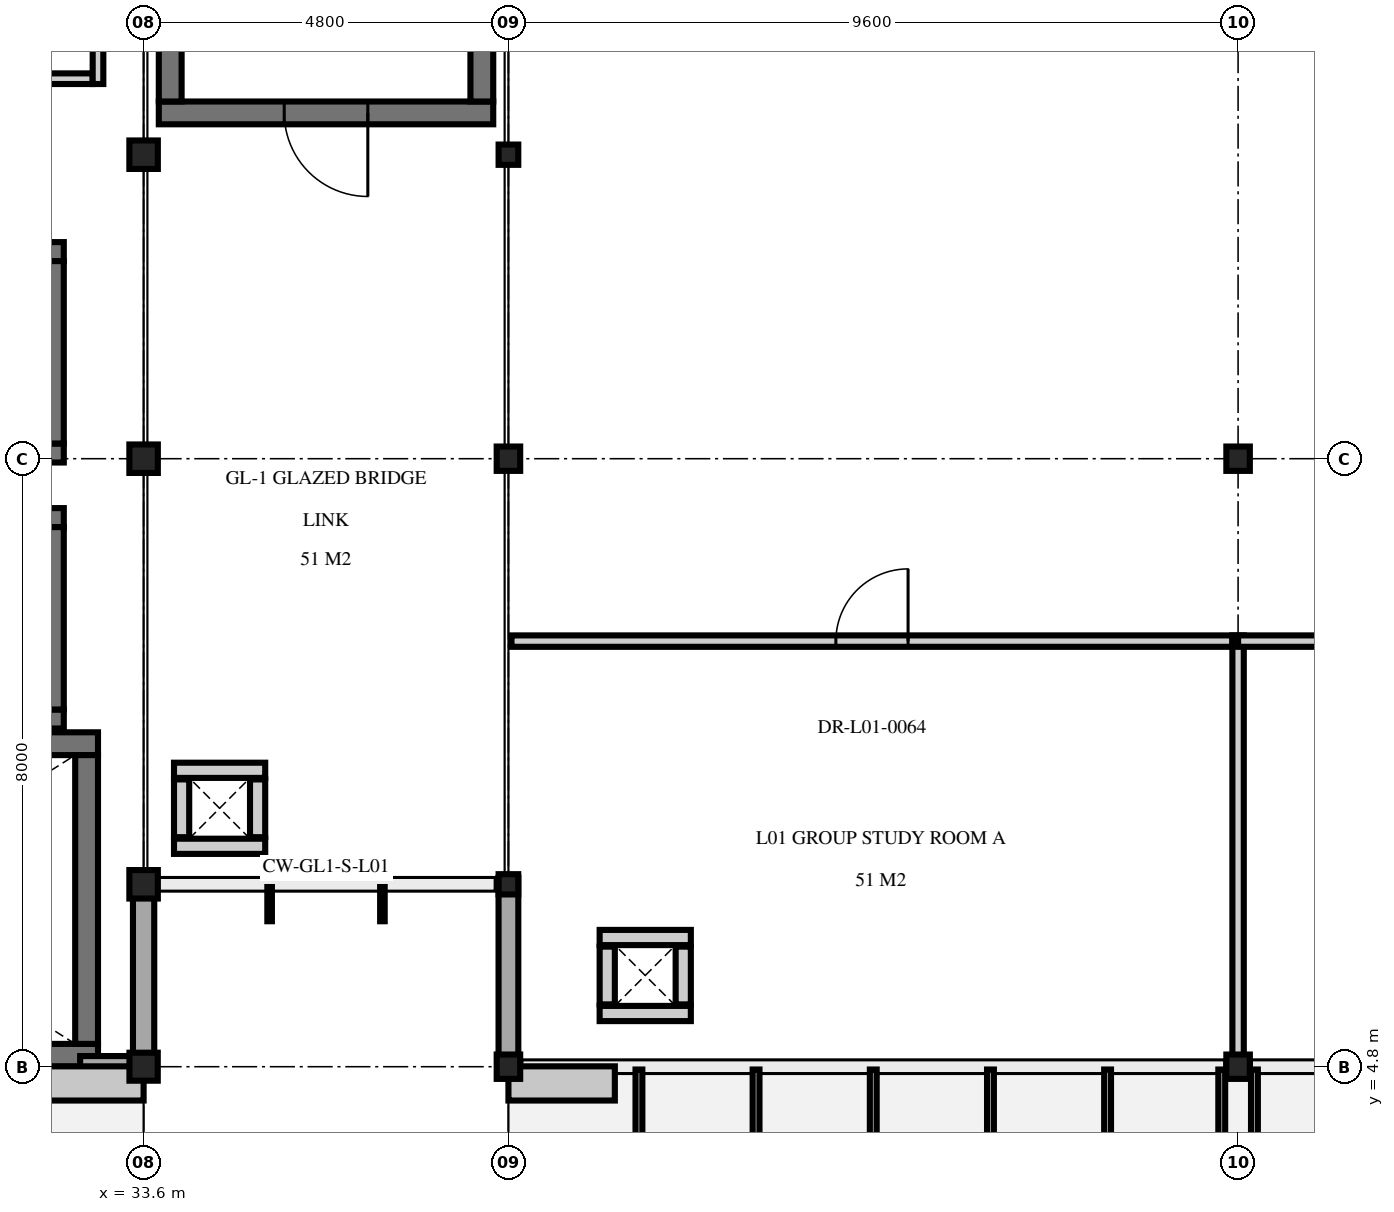
"""IFC4 building model, lengths in metres.
Left out: names, types, materials, properties, quantities, classifications, styles, units other than length and angle.
Written with IfcOpenShell. Run it as: python <this file> out.ifc"""

import sys

from ifc_helpers import new_model, si_unit, direction, frame, frame_2d, origin, origin_2d, place, context, subcontext, project, spatial, rectangle, i_section, extrude, element, fill, save


model = new_model("IFC4")
c1 = context("Model", 3, precision=1e-05, world=origin(), true_north=direction((0.0, 1.0)))
c2 = subcontext(c1, "Body", "Model", "MODEL_VIEW")
j1 = project(units=[si_unit("LENGTHUNIT", "METRE"), si_unit("PLANEANGLEUNIT", "RADIAN")], contexts=[c1])
p1 = place(None, origin())
s1 = spatial("IfcSite", under=j1, at=p1, CompositionType="ELEMENT")
p2 = place(p1, origin())
s2 = spatial("IfcBuilding", under=s1, at=p2, CompositionType="ELEMENT")
p3 = place(p2, frame((0.0, 0.0, 5.1)))
s3 = spatial("IfcBuildingStorey", under=s2, at=p3, CompositionType="ELEMENT", Elevation=5.1)
p4 = place(p3, frame((33.6, 4.8, 0.0), z_axis=(0.0, 0.0, 1.0), x_axis=(1.0, 0.0, 0.0)))
e1 = element("IfcColumn", 1, at=p4, inside=s3, PredefinedType="COLUMN", context=c2, shape_type="SweptSolid", body=[
    extrude(i_section(OverallWidth=0.373, OverallDepth=0.368, WebThickness=0.014, FlangeThickness=0.024, at=origin_2d()), origin(), (0.0, 0.0, 1.0), 4.5),
])
for number, where, z_axis, x_axis in (
    (2, (33.6, 7.2, 0.0), (0.0, 0.0, 1.0), (1.0, 0.0, 0.0)),
    (3, (33.6, 12.8, 0.0), (0.0, 0.0, 1.0), (1.0, 0.0, 0.0)),
    (4, (33.6, 16.8, 0.0), (0.0, 0.0, 1.0), (1.0, 0.0, 0.0)),
):
    element("IfcColumn", number, at=place(p3, frame(where, z_axis=z_axis, x_axis=x_axis)), inside=s3, PredefinedType="COLUMN", context=c2, shape_type="SweptSolid", body=[
        extrude(i_section(OverallWidth=0.375, OverallDepth=0.375, WebThickness=0.017, FlangeThickness=0.027, at=origin_2d()), origin(), (0.0, 0.0, 1.0), 4.5),
    ])
for number, where, z_axis, x_axis in (
    (5, (38.4, 4.8, 0.0), (0.0, 0.0, 1.0), (1.0, 0.0, 0.0)),
    (6, (38.4, 12.8, 0.0), (0.0, 0.0, 1.0), (1.0, 0.0, 0.0)),
    (7, (48.0, 4.8, 0.0), (0.0, 0.0, 1.0), (1.0, 0.0, 0.0)),
    (8, (48.0, 12.8, 0.0), (0.0, 0.0, 1.0), (1.0, 0.0, 0.0)),
):
    element("IfcColumn", number, at=place(p3, frame(where, z_axis=z_axis, x_axis=x_axis)), inside=s3, PredefinedType="COLUMN", context=c2, shape_type="SweptSolid", body=[
        extrude(i_section(OverallWidth=0.309, OverallDepth=0.321, WebThickness=0.014, FlangeThickness=0.022, at=origin_2d()), origin(), (0.0, 0.0, 1.0), 4.5),
    ])
for number, where, z_axis, x_axis in (
    (9, (38.4, 7.2, 0.0), (0.0, 0.0, 1.0), (1.0, 0.0, 0.0)),
    (10, (38.4, 16.8, 0.0), (0.0, 0.0, 1.0), (1.0, 0.0, 0.0)),
):
    element("IfcColumn", number, at=place(p3, frame(where, z_axis=z_axis, x_axis=x_axis)), inside=s3, PredefinedType="COLUMN", context=c2, shape_type="SweptSolid", body=[
        extrude(i_section(OverallWidth=0.259, OverallDepth=0.267, WebThickness=0.013, FlangeThickness=0.021, at=origin_2d()), origin(), (0.0, 0.0, 1.0), 4.5),
    ])
p5 = place(p3, frame((33.0, 4.95, 0.0), z_axis=(0.0, 0.0, 1.0), x_axis=(-1.0, 0.0, 0.0)))
e11 = element("IfcWall", 11, at=p5, inside=s3, PredefinedType="SHEAR", context=c2, shape_type="SweptSolid", body=[
    extrude(rectangle(XDim=8.4, YDim=0.3, at=frame_2d((4.2, 0.0))), origin(), (0.0, 0.0, 1.0), 4.29),
])
p6 = place(p3, frame((24.6, 9.05, 0.0), z_axis=(0.0, 0.0, 1.0), x_axis=(1.0, 0.0, 0.0)))
e12 = element("IfcWall", 12, at=p6, inside=s3, PredefinedType="SHEAR", context=c2, shape_type="SweptSolid", body=[
    extrude(rectangle(XDim=8.4, YDim=0.3, at=frame_2d((4.2, 0.0))), origin(), (0.0, 0.0, 1.0), 4.29),
])
p7 = place(p6, frame((0.65, 0.0, 0.0)))
e13 = element("IfcOpeningElement", 13, at=p7, cuts=e12, PredefinedType="OPENING", context=c2, shape_type="SweptSolid", body=[
    extrude(rectangle(XDim=1.1, YDim=2.2, at=frame_2d((0.55, 1.1))), frame((0.0, 0.16, 0.0), z_axis=(0.0, -1.0, 0.0), x_axis=(1.0, 0.0, 0.0)), (0.0, 0.0, 1.0), 0.32),
])
p8 = place(p3, frame((32.85, 8.9, 0.0), z_axis=(0.0, 0.0, 1.0), x_axis=(0.0, -1.0, 0.0)))
e14 = element("IfcWall", 14, at=p8, inside=s3, PredefinedType="SHEAR", context=c2, shape_type="SweptSolid", body=[
    extrude(rectangle(XDim=3.8, YDim=0.3, at=frame_2d((1.9, 0.0))), origin(), (0.0, 0.0, 1.0), 4.29),
])
p9 = place(p3, frame((38.2, 17.35, 0.0), z_axis=(0.0, 0.0, 1.0), x_axis=(-1.0, 0.0, 0.0)))
e15 = element("IfcWall", 15, at=p9, inside=s3, PredefinedType="SHEAR", context=c2, shape_type="SweptSolid", body=[
    extrude(rectangle(XDim=4.4, YDim=0.3, at=frame_2d((2.2, 0.0))), origin(), (0.0, 0.0, 1.0), 4.29),
])
p10 = place(p9, frame((1.65, 0.0, 0.0)))
e16 = element("IfcOpeningElement", 16, at=p10, cuts=e15, PredefinedType="OPENING", context=c2, shape_type="SweptSolid", body=[
    extrude(rectangle(XDim=1.1, YDim=2.2, at=frame_2d((0.55, 1.1))), frame((0.0, 0.16, 0.0), z_axis=(0.0, -1.0, 0.0), x_axis=(1.0, 0.0, 0.0)), (0.0, 0.0, 1.0), 0.32),
])
for number, where, z_axis, x_axis in (
    (17, (33.95, 17.5, 0.0), (0.0, 0.0, 1.0), (0.0, 1.0, 0.0)),
    (18, (38.05, 25.3, 0.0), (0.0, 0.0, 1.0), (0.0, -1.0, 0.0)),
):
    element("IfcWall", number, at=place(p3, frame(where, z_axis=z_axis, x_axis=x_axis)), inside=s3, PredefinedType="SHEAR", context=c2, shape_type="SweptSolid", body=[
        extrude(rectangle(XDim=7.8, YDim=0.3, at=frame_2d((3.9, 0.0))), origin(), (0.0, 0.0, 1.0), 4.29),
    ])
for number, where, z_axis, x_axis in (
    (19, (32.55, 9.375, 0.0), (0.0, 0.0, 1.0), (-1.0, 0.0, 0.0)),
    (20, (29.65, 12.025, 0.0), (0.0, 0.0, 1.0), (1.0, 0.0, 0.0)),
):
    element("IfcWall", number, at=place(p3, frame(where, z_axis=z_axis, x_axis=x_axis)), inside=s3, PredefinedType="SHEAR", context=c2, shape_type="SweptSolid", body=[
        extrude(rectangle(XDim=2.9, YDim=0.25, at=frame_2d((1.45, 0.0))), origin(), (0.0, 0.0, 1.0), 4.29),
    ])
p11 = place(p3, frame((32.425, 11.9, 0.0), z_axis=(0.0, 0.0, 1.0), x_axis=(0.0, -1.0, 0.0)))
e21 = element("IfcWall", 21, at=p11, inside=s3, PredefinedType="SHEAR", context=c2, shape_type="SweptSolid", body=[
    extrude(rectangle(XDim=2.4, YDim=0.25, at=frame_2d((1.2, 0.0))), origin(), (0.0, 0.0, 1.0), 4.29),
])
p12 = place(p3, frame((32.55, 12.875, 0.0), z_axis=(0.0, 0.0, 1.0), x_axis=(-1.0, 0.0, 0.0)))
e22 = element("IfcWall", 22, at=p12, inside=s3, PredefinedType="SHEAR", context=c2, shape_type="SweptSolid", body=[
    extrude(rectangle(XDim=2.9, YDim=0.25, at=frame_2d((1.45, 0.0))), origin(), (0.0, 0.0, 1.0), 4.29),
])
p13 = place(p3, frame((29.65, 15.525, 0.0), z_axis=(0.0, 0.0, 1.0), x_axis=(1.0, 0.0, 0.0)))
e23 = element("IfcWall", 23, at=p13, inside=s3, PredefinedType="SHEAR", context=c2, shape_type="SweptSolid", body=[
    extrude(rectangle(XDim=2.9, YDim=0.25, at=frame_2d((1.45, 0.0))), origin(), (0.0, 0.0, 1.0), 4.29),
])
p14 = place(p13, frame((0.75, 0.0, 0.0)))
e24 = element("IfcOpeningElement", 24, at=p14, cuts=e23, PredefinedType="OPENING", context=c2, shape_type="SweptSolid", body=[
    extrude(rectangle(XDim=1.4, YDim=2.2, at=frame_2d((0.7, 1.1))), frame((0.0, 0.135, 0.0), z_axis=(0.0, -1.0, 0.0), x_axis=(1.0, 0.0, 0.0)), (0.0, 0.0, 1.0), 0.27),
])
p15 = place(p3, frame((32.425, 15.4, 0.0), z_axis=(0.0, 0.0, 1.0), x_axis=(0.0, -1.0, 0.0)))
e25 = element("IfcWall", 25, at=p15, inside=s3, PredefinedType="SHEAR", context=c2, shape_type="SweptSolid", body=[
    extrude(rectangle(XDim=2.4, YDim=0.25, at=frame_2d((1.2, 0.0))), origin(), (0.0, 0.0, 1.0), 4.29),
])
for number, where, z_axis, x_axis in (
    (26, (40.8, 5.5, 0.0), (0.0, 0.0, 1.0), (-1.0, 0.0, 0.0)),
    (27, (39.6, 6.5, 0.0), (0.0, 0.0, 1.0), (1.0, 0.0, 0.0)),
):
    element("IfcWall", number, at=place(p3, frame(where, z_axis=z_axis, x_axis=x_axis)), inside=s3, PredefinedType="PARTITIONING", context=c2, shape_type="SweptSolid", body=[
        extrude(rectangle(XDim=1.2, YDim=0.2, at=frame_2d((0.6, 0.0))), origin(), (0.0, 0.0, 1.0), 3.79),
    ])
for number, where, z_axis, x_axis in (
    (28, (39.7, 5.62, 0.0), (0.0, 0.0, 1.0), (0.0, 1.0, 0.0)),
    (29, (40.7, 6.38, 0.0), (0.0, 0.0, 1.0), (0.0, -1.0, 0.0)),
):
    element("IfcWall", number, at=place(p3, frame(where, z_axis=z_axis, x_axis=x_axis)), inside=s3, PredefinedType="PARTITIONING", context=c2, shape_type="SweptSolid", body=[
        extrude(rectangle(XDim=0.76, YDim=0.2, at=frame_2d((0.38, 0.0))), origin(), (0.0, 0.0, 1.0), 3.79),
    ])
for number, where, z_axis, x_axis in (
    (30, (35.2, 7.7, 0.0), (0.0, 0.0, 1.0), (-1.0, 0.0, 0.0)),
    (31, (34.0, 8.7, 0.0), (0.0, 0.0, 1.0), (1.0, 0.0, 0.0)),
):
    element("IfcWall", number, at=place(p3, frame(where, z_axis=z_axis, x_axis=x_axis)), inside=s3, PredefinedType="PARTITIONING", context=c2, shape_type="SweptSolid", body=[
        extrude(rectangle(XDim=1.2, YDim=0.2, at=frame_2d((0.6, 0.0))), origin(), (0.0, 0.0, 1.0), 3.79),
    ])
for number, where, z_axis, x_axis in (
    (32, (34.1, 7.82, 0.0), (0.0, 0.0, 1.0), (0.0, 1.0, 0.0)),
    (33, (35.1, 8.58, 0.0), (0.0, 0.0, 1.0), (0.0, -1.0, 0.0)),
):
    element("IfcWall", number, at=place(p3, frame(where, z_axis=z_axis, x_axis=x_axis)), inside=s3, PredefinedType="PARTITIONING", context=c2, shape_type="SweptSolid", body=[
        extrude(rectangle(XDim=0.76, YDim=0.2, at=frame_2d((0.38, 0.0))), origin(), (0.0, 0.0, 1.0), 3.79),
    ])
p16 = place(p3, frame((33.685, 4.8, 0.0), z_axis=(0.0, 0.0, 1.0), x_axis=(-1.0, 0.0, 0.0)))
e34 = element("IfcWall", 34, at=p16, inside=s3, PredefinedType="SOLIDWALL", context=c2, shape_type="SweptSolid", body=[
    extrude(rectangle(XDim=0.92, YDim=0.28, at=frame_2d((0.46, 0.0))), origin(), (0.0, 0.0, 1.0), 3.765),
])
p17 = place(p3, frame((33.6, 7.285, 0.0), z_axis=(0.0, 0.0, 1.0), x_axis=(0.0, -1.0, 0.0)))
e35 = element("IfcWall", 35, at=p17, inside=s3, PredefinedType="SOLIDWALL", context=c2, shape_type="SweptSolid", body=[
    extrude(rectangle(XDim=2.57, YDim=0.28, at=frame_2d((1.285, 0.0))), origin(), (0.0, 0.0, 1.0), 3.765),
])
p18 = place(p3, frame((38.4, 4.715, 0.0), z_axis=(0.0, 0.0, 1.0), x_axis=(0.0, 1.0, 0.0)))
e36 = element("IfcWall", 36, at=p18, inside=s3, PredefinedType="SOLIDWALL", context=c2, shape_type="SweptSolid", body=[
    extrude(rectangle(XDim=2.57, YDim=0.26, at=frame_2d((1.285, 0.0))), origin(), (0.0, 0.0, 1.0), 3.765),
])
p19 = place(p3, frame((29.57, 17.8, 0.0), z_axis=(0.0, 0.0, 1.0), x_axis=(1.0, 0.0, 0.0)))
e37 = element("IfcWall", 37, at=p19, inside=s3, PredefinedType="PARTITIONING", context=c2, shape_type="SweptSolid", body=[
    extrude(rectangle(XDim=3.36, YDim=0.14, at=frame_2d((1.68, 0.0))), origin(), (0.0, 0.0, 1.0), 4.045),
])
p20 = place(p3, frame((33.0, 17.73, 0.0), z_axis=(0.0, 0.0, 1.0), x_axis=(0.0, 1.0, 0.0)))
e38 = element("IfcWall", 38, at=p20, inside=s3, PredefinedType="PARTITIONING", context=c2, shape_type="SweptSolid", body=[
    extrude(rectangle(XDim=4.24, YDim=0.14, at=frame_2d((2.12, 0.0))), origin(), (0.0, 0.0, 1.0), 3.765),
])
p21 = place(p3, frame((38.44, 10.4, 0.0), z_axis=(0.0, 0.0, 1.0), x_axis=(1.0, 0.0, 0.0)))
e39 = element("IfcWall", 39, at=p21, inside=s3, PredefinedType="PARTITIONING", context=c2, shape_type="SweptSolid", body=[
    extrude(rectangle(XDim=9.485, YDim=0.15, at=frame_2d((4.743, 0.0))), origin(), (0.0, 0.0, 1.0), 3.905),
])
p22 = place(p21, frame((4.268, 0.0, 0.0)))
e40 = element("IfcOpeningElement", 40, at=p22, cuts=e39, PredefinedType="OPENING", context=c2, shape_type="SweptSolid", body=[
    extrude(rectangle(XDim=0.95, YDim=2.15, at=frame_2d((0.475, 1.075))), frame((0.0, 0.085, 0.0), z_axis=(0.0, -1.0, 0.0), x_axis=(1.0, 0.0, 0.0)), (0.0, 0.0, 1.0), 0.17),
])
p23 = place(p3, frame((48.0, 4.84, 0.0), z_axis=(0.0, 0.0, 1.0), x_axis=(0.0, 1.0, 0.0)))
e41 = element("IfcWall", 41, at=p23, inside=s3, PredefinedType="PARTITIONING", context=c2, shape_type="SweptSolid", body=[
    extrude(rectangle(XDim=5.635, YDim=0.15, at=frame_2d((2.817, 0.0))), origin(), (0.0, 0.0, 1.0), 3.765),
])
p24 = place(p3, frame((48.0, 10.4, 0.0), z_axis=(0.0, 0.0, 1.0), x_axis=(1.0, 0.0, 0.0)))
e42 = element("IfcWall", 42, at=p24, inside=s3, PredefinedType="PARTITIONING", context=c2, shape_type="SweptSolid", body=[
    extrude(rectangle(XDim=9.525, YDim=0.15, at=frame_2d((4.762, 0.0))), origin(), (0.0, 0.0, 1.0), 3.905),
])
p25 = place(p24, frame((4.287, 0.0, 0.0)))
e43 = element("IfcOpeningElement", 43, at=p25, cuts=e42, PredefinedType="OPENING", context=c2, shape_type="SweptSolid", body=[
    extrude(rectangle(XDim=0.95, YDim=2.15, at=frame_2d((0.475, 1.075))), frame((0.0, 0.085, 0.0), z_axis=(0.0, -1.0, 0.0), x_axis=(1.0, 0.0, 0.0)), (0.0, 0.0, 1.0), 0.17),
])
p26 = place(p10, origin())
e44 = element("IfcDoor", 44, at=p26, inside=s3, OperationType="SINGLE_SWING_LEFT", PredefinedType="DOOR", context=c2, shape_type="SweptSolid", body=[
    extrude(rectangle(XDim=1.1, YDim=2.2, at=frame_2d((0.55, 1.1))), frame((0.0, 0.025, 0.0), z_axis=(0.0, -1.0, 0.0), x_axis=(1.0, 0.0, 0.0)), (0.0, 0.0, 1.0), 0.05),
])
fill(e16, e44)
p27 = place(p22, origin())
e45 = element("IfcDoor", 45, at=p27, inside=s3, OperationType="SINGLE_SWING_RIGHT", PredefinedType="DOOR", context=c2, shape_type="SweptSolid", body=[
    extrude(rectangle(XDim=0.95, YDim=2.15, at=frame_2d((0.475, 1.075))), frame((0.0, 0.025, 0.0), z_axis=(0.0, -1.0, 0.0), x_axis=(1.0, 0.0, 0.0)), (0.0, 0.0, 1.0), 0.05),
])
fill(e40, e45)
save(model, sys.argv[1])
